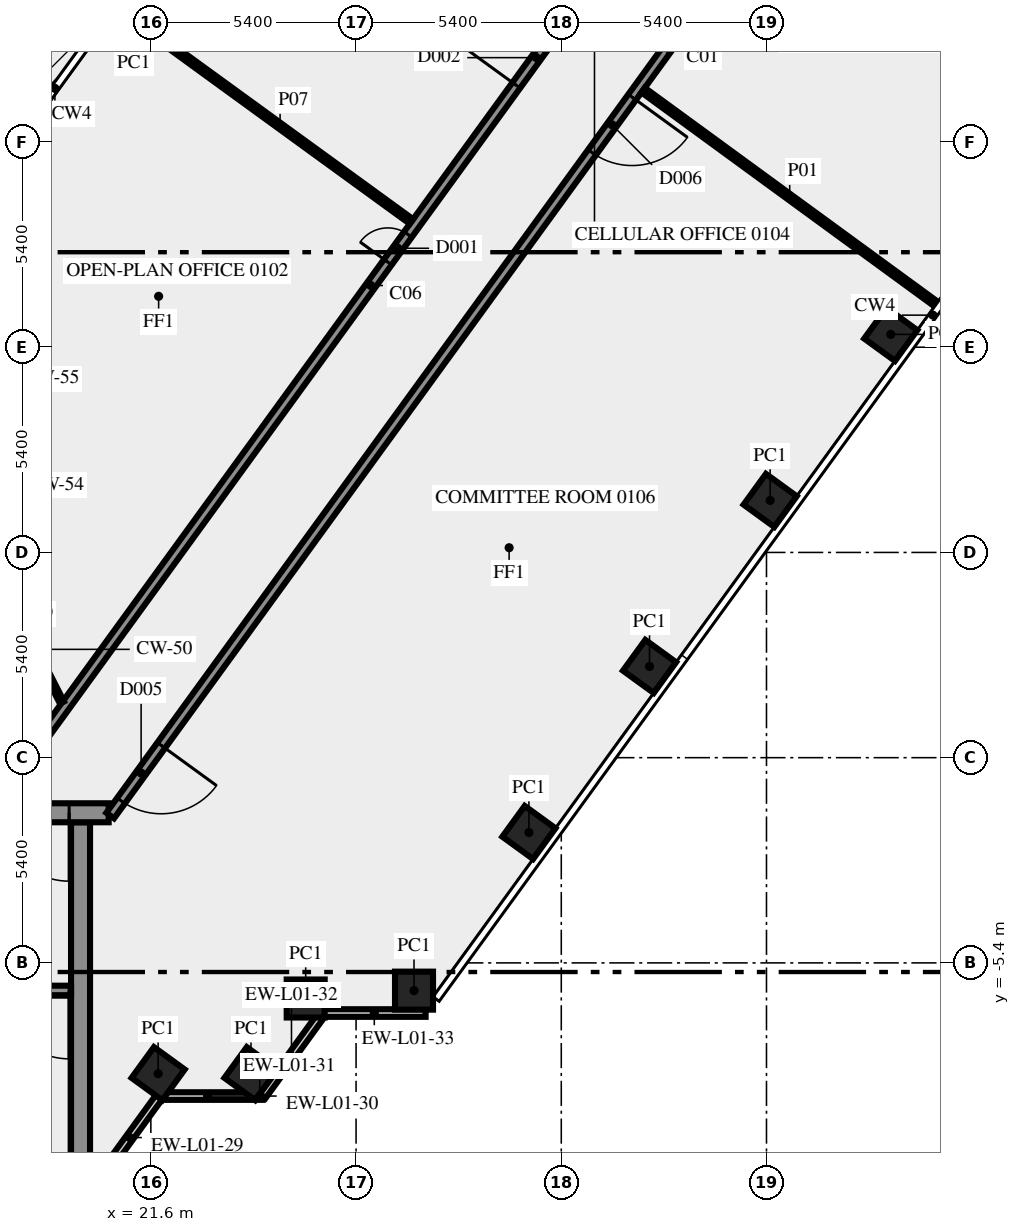
"""IFC4 building model, lengths in metres.
Left out: names, types, materials, properties, quantities, classifications, styles, units other than length and angle.
Written with IfcOpenShell. Run it as: python <this file> out.ifc"""

import sys

from ifc_helpers import new_model, si_unit, direction, frame, frame_2d, origin, origin_2d, place, context, subcontext, project, spatial, rectangle, extrude, element, fill, save


model = new_model("IFC4")
c1 = context("Model", 3, precision=1e-05, world=origin(), true_north=direction((0.0, 1.0)))
c2 = subcontext(c1, "Body", "Model", "MODEL_VIEW")
j1 = project(units=[si_unit("LENGTHUNIT", "METRE"), si_unit("PLANEANGLEUNIT", "RADIAN")], contexts=[c1])
p1 = place(None, origin())
s1 = spatial("IfcSite", under=j1, at=p1, CompositionType="ELEMENT")
p2 = place(p1, origin())
s2 = spatial("IfcBuilding", under=s1, at=p2, CompositionType="ELEMENT")
p3 = place(p2, frame((0.0, 0.0, 6.0)))
s3 = spatial("IfcBuildingStorey", under=s2, at=p3, CompositionType="ELEMENT", Elevation=6.0)
for number, where, z_axis, x_axis in (
    (1, (21.792, -8.315, 0.0), (0.0, 0.0, 1.0), (0.588, 0.809, 0.0)),
    (2, (24.235, -8.315, 0.0), (0.0, 0.0, 1.0), (0.588, 0.809, 0.0)),
    (3, (25.674, -6.337, 0.0), (0.0, 0.0, 1.0), (1.0, 0.0, 0.0)),
    (4, (28.525, -6.13, 0.0), (0.0, 0.0, 1.0), (1.0, 0.0, 0.0)),
    (5, (31.548, -1.969, 0.0), (0.0, 0.0, 1.0), (0.588, 0.809, 0.0)),
    (6, (34.722, 2.4, 0.0), (0.0, 0.0, 1.0), (0.588, 0.809, 0.0)),
    (7, (37.896, 6.769, 0.0), (0.0, 0.0, 1.0), (0.588, 0.809, 0.0)),
    (8, (41.07, 11.137, 0.0), (0.0, 0.0, 1.0), (0.588, 0.809, 0.0)),
):
    element("IfcColumn", number, at=place(p3, frame(where, z_axis=z_axis, x_axis=x_axis)), inside=s3, PredefinedType="COLUMN", context=c2, shape_type="SweptSolid", body=[
        extrude(rectangle(XDim=1.0, YDim=1.0, at=origin_2d()), origin(), (0.0, 0.0, 1.0), 5.1),
    ])
p4 = place(p3, frame((20.253, -11.083, 0.0), z_axis=(0.0, 0.0, 1.0), x_axis=(0.587766567315, 0.809030569476, 0.0)))
e9 = element("IfcWall", 9, at=p4, inside=s3, PredefinedType="SOLIDWALL", context=c2, shape_type="SweptSolid", body=[
    extrude(rectangle(XDim=2.688, YDim=0.2, at=frame_2d((1.344, 0.0))), origin(), (0.0, 0.0, 1.0), 5.1),
])
p5 = place(p3, frame((21.943, -8.904, 0.0), z_axis=(0.0, 0.0, 1.0), x_axis=(1.0, 0.0, 0.0)))
e10 = element("IfcWall", 10, at=p5, inside=s3, PredefinedType="SOLIDWALL", context=c2, shape_type="SweptSolid", body=[
    extrude(rectangle(XDim=2.298, YDim=0.2, at=frame_2d((1.149, 0.0))), origin(), (0.0, 0.0, 1.0), 5.1),
])
p6 = place(p3, frame((24.387, -8.904, 0.0), z_axis=(0.0, 0.0, 1.0), x_axis=(1.0, 0.0, 0.0)))
e11 = element("IfcWall", 11, at=p6, inside=s3, PredefinedType="SOLIDWALL", context=c2, shape_type="SweptSolid", body=[
    extrude(rectangle(XDim=0.156, YDim=0.2, at=frame_2d((0.078, 0.0))), origin(), (0.0, 0.0, 1.0), 5.1),
])
p7 = place(p3, frame((24.54, -8.899, 0.0), z_axis=(0.0, 0.0, 1.0), x_axis=(0.587700286833, 0.809078718578, 0.0)))
e12 = element("IfcWall", 12, at=p7, inside=s3, PredefinedType="SOLIDWALL", context=c2, shape_type="SweptSolid", body=[
    extrude(rectangle(XDim=2.587, YDim=0.2, at=frame_2d((1.293, 0.0))), origin(), (0.0, 0.0, 1.0), 5.1),
])
p8 = place(p3, frame((26.13, -6.719, 0.0), z_axis=(0.0, 0.0, 1.0), x_axis=(1.0, 0.0, 0.0)))
e13 = element("IfcWall", 13, at=p8, inside=s3, PredefinedType="SOLIDWALL", context=c2, shape_type="SweptSolid", body=[
    extrude(rectangle(XDim=2.7, YDim=0.2, at=frame_2d((1.35, 0.0))), origin(), (0.0, 0.0, 1.0), 5.1),
])
p9 = place(p3, frame((19.75, -10.5, 0.0), z_axis=(0.0, 0.0, 1.0), x_axis=(0.0, 1.0, 0.0)))
e14 = element("IfcWall", 14, at=p9, inside=s3, PredefinedType="SHEAR", context=c2, shape_type="SweptSolid", body=[
    extrude(rectangle(XDim=8.8, YDim=0.5, at=frame_2d((4.4, 0.0))), origin(), (0.0, 0.0, 1.0), 5.1),
])
p10 = place(p3, frame((19.5, -6.125, 0.0), z_axis=(0.0, 0.0, 1.0), x_axis=(-1.0, 0.0, 0.0)))
e15 = element("IfcWall", 15, at=p10, inside=s3, PredefinedType="SHEAR", context=c2, shape_type="SweptSolid", body=[
    extrude(rectangle(XDim=8.05, YDim=0.25, at=frame_2d((4.025, 0.0))), origin(), (0.0, 0.0, 1.0), 5.1),
])
p11 = place(p10, frame((0.05, 0.0, 0.0)))
e16 = element("IfcOpeningElement", 16, at=p11, cuts=e15, PredefinedType="OPENING", context=c2, shape_type="SweptSolid", body=[
    extrude(rectangle(XDim=1.8, YDim=2.1, at=frame_2d((0.9, 1.05))), frame((0.0, 0.135, 0.0), z_axis=(0.0, -1.0, 0.0), x_axis=(1.0, 0.0, 0.0)), (0.0, 0.0, 1.0), 0.27),
])
p12 = place(p3, frame((20.49, -1.45, 0.0), z_axis=(0.0, 0.0, 1.0), x_axis=(-1.0, 0.0, 0.0)))
e17 = element("IfcWall", 17, at=p12, inside=s3, PredefinedType="SHEAR", context=c2, shape_type="SweptSolid", body=[
    extrude(rectangle(XDim=40.98, YDim=0.5, at=frame_2d((20.49, 0.0))), origin(), (0.0, 0.0, 1.0), 5.1),
])
p13 = place(p12, frame((38.14, 0.0, 0.0)))
e18 = element("IfcOpeningElement", 18, at=p13, cuts=e17, PredefinedType="OPENING", context=c2, shape_type="SweptSolid", body=[
    extrude(rectangle(XDim=1.8, YDim=2.1, at=frame_2d((0.9, 1.05))), frame((0.0, 0.26, 0.0), z_axis=(0.0, -1.0, 0.0), x_axis=(1.0, 0.0, 0.0)), (0.0, 0.0, 1.0), 0.52),
])
p14 = place(p12, frame((36.728, 0.0, 0.0)))
e19 = element("IfcOpeningElement", 19, at=p14, cuts=e17, PredefinedType="OPENING", context=c2, shape_type="SweptSolid", body=[
    extrude(rectangle(XDim=0.8, YDim=2.1, at=frame_2d((0.4, 1.05))), frame((0.0, 0.26, 0.0), z_axis=(0.0, -1.0, 0.0), x_axis=(1.0, 0.0, 0.0)), (0.0, 0.0, 1.0), 0.52),
])
p15 = place(p12, frame((35.153, 0.0, 0.0)))
e20 = element("IfcOpeningElement", 20, at=p15, cuts=e17, PredefinedType="OPENING", context=c2, shape_type="SweptSolid", body=[
    extrude(rectangle(XDim=0.8, YDim=2.1, at=frame_2d((0.4, 1.05))), frame((0.0, 0.26, 0.0), z_axis=(0.0, -1.0, 0.0), x_axis=(1.0, 0.0, 0.0)), (0.0, 0.0, 1.0), 0.52),
])
p16 = place(p12, frame((32.94, 0.0, 0.0)))
e21 = element("IfcOpeningElement", 21, at=p16, cuts=e17, PredefinedType="OPENING", context=c2, shape_type="SweptSolid", body=[
    extrude(rectangle(XDim=0.9, YDim=2.1, at=frame_2d((0.45, 1.05))), frame((0.0, 0.26, 0.0), z_axis=(0.0, -1.0, 0.0), x_axis=(1.0, 0.0, 0.0)), (0.0, 0.0, 1.0), 0.52),
])
p17 = place(p12, frame((19.59, 0.0, 0.0)))
e22 = element("IfcOpeningElement", 22, at=p17, cuts=e17, PredefinedType="OPENING", context=c2, shape_type="SweptSolid", body=[
    extrude(rectangle(XDim=2.0, YDim=2.1, at=frame_2d((1.0, 1.05))), frame((0.0, 0.26, 0.0), z_axis=(0.0, -1.0, 0.0), x_axis=(1.0, 0.0, 0.0)), (0.0, 0.0, 1.0), 0.52),
])
p18 = place(p12, frame((7.14, 0.0, 0.0)))
e23 = element("IfcOpeningElement", 23, at=p18, cuts=e17, PredefinedType="OPENING", context=c2, shape_type="SweptSolid", body=[
    extrude(rectangle(XDim=0.9, YDim=2.1, at=frame_2d((0.45, 1.05))), frame((0.0, 0.26, 0.0), z_axis=(0.0, -1.0, 0.0), x_axis=(1.0, 0.0, 0.0)), (0.0, 0.0, 1.0), 0.52),
])
p19 = place(p12, frame((4.19, 0.0, 0.0)))
e24 = element("IfcOpeningElement", 24, at=p19, cuts=e17, PredefinedType="OPENING", context=c2, shape_type="SweptSolid", body=[
    extrude(rectangle(XDim=0.9, YDim=2.1, at=frame_2d((0.45, 1.05))), frame((0.0, 0.26, 0.0), z_axis=(0.0, -1.0, 0.0), x_axis=(1.0, 0.0, 0.0)), (0.0, 0.0, 1.0), 0.52),
])
p20 = place(p12, frame((1.04, 0.0, 0.0)))
e25 = element("IfcOpeningElement", 25, at=p20, cuts=e17, PredefinedType="OPENING", context=c2, shape_type="SweptSolid", body=[
    extrude(rectangle(XDim=1.8, YDim=2.1, at=frame_2d((0.9, 1.05))), frame((0.0, 0.26, 0.0), z_axis=(0.0, -1.0, 0.0), x_axis=(1.0, 0.0, 0.0)), (0.0, 0.0, 1.0), 0.52),
])
p21 = place(p3, frame((49.869, 38.856, 0.0), z_axis=(0.0, 0.0, 1.0), x_axis=(-0.587784522481, -0.809017524614, 0.0)))
e26 = element("IfcWall", 26, at=p21, inside=s3, PredefinedType="SOLIDWALL", context=c2, shape_type="SweptSolid", body=[
    extrude(rectangle(XDim=49.912, YDim=0.25, at=frame_2d((24.956, 0.0))), origin(), (0.0, 0.0, 1.0), 5.1),
])
p22 = place(p21, frame((17.146, 0.0, 0.0)))
e27 = element("IfcOpeningElement", 27, at=p22, cuts=e26, PredefinedType="OPENING", context=c2, shape_type="SweptSolid", body=[
    extrude(rectangle(XDim=0.9, YDim=2.1, at=frame_2d((0.45, 1.05))), frame((0.0, 0.135, 0.0), z_axis=(0.0, -1.0, 0.0), x_axis=(1.0, 0.0, 0.0)), (0.0, 0.0, 1.0), 0.27),
])
p23 = place(p21, frame((47.629, 0.0, 0.0)))
e28 = element("IfcOpeningElement", 28, at=p23, cuts=e26, PredefinedType="OPENING", context=c2, shape_type="SweptSolid", body=[
    extrude(rectangle(XDim=1.8, YDim=2.1, at=frame_2d((0.9, 1.05))), frame((0.0, 0.135, 0.0), z_axis=(0.0, -1.0, 0.0), x_axis=(1.0, 0.0, 0.0)), (0.0, 0.0, 1.0), 0.27),
])
p24 = place(p21, frame((26.547, 0.0, 0.0)))
e29 = element("IfcOpeningElement", 29, at=p24, cuts=e26, PredefinedType="OPENING", context=c2, shape_type="SweptSolid", body=[
    extrude(rectangle(XDim=1.8, YDim=2.1, at=frame_2d((0.9, 1.05))), frame((0.0, 0.135, 0.0), z_axis=(0.0, -1.0, 0.0), x_axis=(1.0, 0.0, 0.0)), (0.0, 0.0, 1.0), 0.27),
])
p25 = place(p21, frame((0.442, 0.0, 0.0)))
e30 = element("IfcOpeningElement", 30, at=p25, cuts=e26, PredefinedType="OPENING", context=c2, shape_type="SweptSolid", body=[
    extrude(rectangle(XDim=0.9, YDim=2.1, at=frame_2d((0.45, 1.05))), frame((0.0, 0.135, 0.0), z_axis=(0.0, -1.0, 0.0), x_axis=(1.0, 0.0, 0.0)), (0.0, 0.0, 1.0), 0.27),
])
p26 = place(p3, frame((17.545, -1.125, 0.0), z_axis=(0.0, 0.0, 1.0), x_axis=(0.587786323093, 0.809016216391, 0.0)))
e31 = element("IfcWall", 31, at=p26, inside=s3, PredefinedType="SOLIDWALL", context=c2, shape_type="SweptSolid", body=[
    extrude(rectangle(XDim=33.493, YDim=0.25, at=frame_2d((16.747, 0.0))), origin(), (0.0, 0.0, 1.0), 5.1),
])
p27 = place(p26, frame((17.508, 0.0, 0.0)))
e32 = element("IfcOpeningElement", 32, at=p27, cuts=e31, PredefinedType="OPENING", context=c2, shape_type="SweptSolid", body=[
    extrude(rectangle(XDim=0.9, YDim=2.1, at=frame_2d((0.45, 1.05))), frame((0.0, 0.135, 0.0), z_axis=(0.0, -1.0, 0.0), x_axis=(1.0, 0.0, 0.0)), (0.0, 0.0, 1.0), 0.27),
])
p28 = place(p26, frame((29.908, 0.0, 0.0)))
e33 = element("IfcOpeningElement", 33, at=p28, cuts=e31, PredefinedType="OPENING", context=c2, shape_type="SweptSolid", body=[
    extrude(rectangle(XDim=0.9, YDim=2.1, at=frame_2d((0.45, 1.05))), frame((0.0, 0.135, 0.0), z_axis=(0.0, -1.0, 0.0), x_axis=(1.0, 0.0, 0.0)), (0.0, 0.0, 1.0), 0.27),
])
p29 = place(p26, frame((23.258, 0.0, 0.0)))
e34 = element("IfcOpeningElement", 34, at=p29, cuts=e31, PredefinedType="OPENING", context=c2, shape_type="SweptSolid", body=[
    extrude(rectangle(XDim=1.8, YDim=2.1, at=frame_2d((0.9, 1.05))), frame((0.0, 0.135, 0.0), z_axis=(0.0, -1.0, 0.0), x_axis=(1.0, 0.0, 0.0)), (0.0, 0.0, 1.0), 0.27),
])
p30 = place(p3, frame((34.554, 17.565, 0.0), z_axis=(0.0, 0.0, 1.0), x_axis=(0.807645841498, -0.589667868135, 0.0)))
e35 = element("IfcWall", 35, at=p30, inside=s3, PredefinedType="PARTITIONING", context=c2, shape_type="SweptSolid", body=[
    extrude(rectangle(XDim=9.551, YDim=0.15, at=frame_2d((4.775, 0.0))), origin(), (0.0, 0.0, 1.0), 4.1),
])
p31 = place(p3, frame((28.457, 14.108, 0.0), z_axis=(0.0, 0.0, 1.0), x_axis=(-0.809000394931, 0.587808098789, 0.0)))
e36 = element("IfcWall", 36, at=p31, inside=s3, PredefinedType="PARTITIONING", context=c2, shape_type="SweptSolid", body=[
    extrude(rectangle(XDim=8.545, YDim=0.15, at=frame_2d((4.272, 0.0))), origin(), (0.0, 0.0, 1.0), 5.1),
])
p32 = place(p3, frame((18.0, 3.925, 0.0), z_axis=(0.0, 0.0, 1.0), x_axis=(0.453950796792, -0.891026752736, 0.0)))
e37 = element("IfcWall", 37, at=p32, inside=s3, PredefinedType="PARTITIONING", context=c2, shape_type="SweptSolid", body=[
    extrude(rectangle(XDim=2.778, YDim=0.12, at=frame_2d((1.389, 0.0))), origin(), (0.0, 0.0, 1.0), 5.1),
])
p33 = place(p11, origin())
e38 = element("IfcDoor", 38, at=p33, inside=s3, OperationType="DOUBLE_DOOR_SINGLE_SWING", PredefinedType="DOOR", context=c2, shape_type="SweptSolid", body=[
    extrude(rectangle(XDim=1.8, YDim=2.1, at=frame_2d((0.9, 1.05))), frame((0.0, 0.025, 0.0), z_axis=(0.0, -1.0, 0.0), x_axis=(1.0, 0.0, 0.0)), (0.0, 0.0, 1.0), 0.05),
])
fill(e16, e38)
p34 = place(p20, origin())
e39 = element("IfcDoor", 39, at=p34, inside=s3, OperationType="DOUBLE_DOOR_SINGLE_SWING", PredefinedType="DOOR", context=c2, shape_type="SweptSolid", body=[
    extrude(rectangle(XDim=1.8, YDim=2.1, at=frame_2d((0.9, 1.05))), frame((0.0, 0.025, 0.0), z_axis=(0.0, -1.0, 0.0), x_axis=(1.0, 0.0, 0.0)), (0.0, 0.0, 1.0), 0.05),
])
fill(e25, e39)
p35 = place(p27, origin())
e40 = element("IfcDoor", 40, at=p35, inside=s3, OperationType="SINGLE_SWING_RIGHT", PredefinedType="DOOR", context=c2, shape_type="SweptSolid", body=[
    extrude(rectangle(XDim=0.9, YDim=2.1, at=frame_2d((0.45, 1.05))), frame((0.0, 0.025, 0.0), z_axis=(0.0, -1.0, 0.0), x_axis=(1.0, 0.0, 0.0)), (0.0, 0.0, 1.0), 0.05),
])
fill(e32, e40)
p36 = place(p23, origin())
e41 = element("IfcDoor", 41, at=p36, inside=s3, OperationType="DOUBLE_DOOR_SINGLE_SWING", PredefinedType="DOOR", context=c2, shape_type="SweptSolid", body=[
    extrude(rectangle(XDim=1.8, YDim=2.1, at=frame_2d((0.9, 1.05))), frame((0.0, 0.025, 0.0), z_axis=(0.0, -1.0, 0.0), x_axis=(1.0, 0.0, 0.0)), (0.0, 0.0, 1.0), 0.05),
])
fill(e28, e41)
p37 = place(p24, origin())
e42 = element("IfcDoor", 42, at=p37, inside=s3, OperationType="DOUBLE_DOOR_SINGLE_SWING", PredefinedType="DOOR", context=c2, shape_type="SweptSolid", body=[
    extrude(rectangle(XDim=1.8, YDim=2.1, at=frame_2d((0.9, 1.05))), frame((0.0, 0.025, 0.0), z_axis=(0.0, -1.0, 0.0), x_axis=(1.0, 0.0, 0.0)), (0.0, 0.0, 1.0), 0.05),
])
fill(e29, e42)
p38 = place(p29, origin())
e43 = element("IfcDoor", 43, at=p38, inside=s3, OperationType="DOUBLE_DOOR_SINGLE_SWING", PredefinedType="DOOR", context=c2, shape_type="SweptSolid", body=[
    extrude(rectangle(XDim=1.8, YDim=2.1, at=frame_2d((0.9, 1.05))), frame((0.0, 0.025, 0.0), z_axis=(0.0, -1.0, 0.0), x_axis=(1.0, 0.0, 0.0)), (0.0, 0.0, 1.0), 0.05),
])
fill(e34, e43)
save(model, sys.argv[1])
